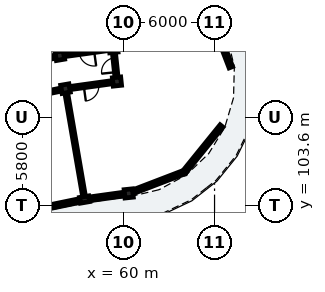
"""IFC4 building model, lengths in metres.
Left out: names, types, materials, properties, quantities, classifications, styles, units other than length and angle.
Written with IfcOpenShell. Run it as: python <this file> out.ifc"""

import sys

from ifc_helpers import new_model, si_unit, direction, frame, frame_2d, origin, origin_2d, place, context, subcontext, project, spatial, rectangle, extrude, element, fill, save


model = new_model("IFC4")
c1 = context("Model", 3, precision=1e-05, world=origin(), true_north=direction((0.0, 1.0)))
c2 = subcontext(c1, "Body", "Model", "MODEL_VIEW")
j1 = project(units=[si_unit("LENGTHUNIT", "METRE"), si_unit("PLANEANGLEUNIT", "RADIAN")], contexts=[c1])
p1 = place(None, origin())
s1 = spatial("IfcSite", under=j1, at=p1, CompositionType="ELEMENT")
p2 = place(p1, origin())
s2 = spatial("IfcBuilding", under=s1, at=p2, CompositionType="ELEMENT")
p3 = place(p2, frame((0.0, 0.0, 15.56)))
s3 = spatial("IfcBuildingStorey", under=s2, at=p3, CompositionType="ELEMENT", Elevation=15.56)
for number, where, z_axis, x_axis in (
    (1, (60.354, 104.406, 0.0), (0.0, 0.0, 1.0), (-0.105, 0.995, 0.0)),
    (2, (59.58, 111.766, 0.0), (0.0, 0.0, 1.0), (-0.105, 0.995, 0.0)),
    (3, (59.35, 113.954, 0.0), (0.0, 0.0, 1.0), (-0.105, 0.995, 0.0)),
):
    element("IfcColumn", number, at=place(p3, frame(where, z_axis=z_axis, x_axis=x_axis)), inside=s3, PredefinedType="COLUMN", context=c2, shape_type="SweptSolid", body=[
        extrude(rectangle(XDim=0.55, YDim=0.55, at=origin_2d()), origin(), (0.0, 0.0, 1.0), 3.11),
    ])
p4 = place(p3, frame((57.451, 104.004, 0.0), z_axis=(0.0, 0.0, 1.0), x_axis=(-0.169827298811, 0.985473839622, 0.0)))
e4 = element("IfcColumn", 4, at=p4, inside=s3, PredefinedType="PILASTER", context=c2, shape_type="SweptSolid", body=[
    extrude(rectangle(XDim=0.38, YDim=0.62, at=origin_2d()), origin(), (0.0, 0.0, 1.0), 3.11),
])
for number, where, z_axis, x_axis in (
    (5, (56.194, 111.297, 0.0), (0.0, 0.0, 1.0), (-0.17, 0.985, 0.0)),
    (6, (55.821, 113.465, 0.0), (0.0, 0.0, 1.0), (-0.17, 0.985, 0.0)),
):
    element("IfcColumn", number, at=place(p3, frame(where, z_axis=z_axis, x_axis=x_axis)), inside=s3, PredefinedType="COLUMN", context=c2, shape_type="SweptSolid", body=[
        extrude(rectangle(XDim=0.55, YDim=0.55, at=origin_2d()), origin(), (0.0, 0.0, 1.0), 3.11),
    ])
p5 = place(p3, frame((60.111, 104.373, 0.0), z_axis=(0.0, 0.0, 1.0), x_axis=(-0.990545622952, -0.13718370476, 0.0)))
e7 = element("IfcWall", 7, at=p5, inside=s3, PredefinedType="SOLIDWALL", context=c2, shape_type="SweptSolid", body=[
    extrude(rectangle(XDim=2.525, YDim=0.245, at=frame_2d((1.263, 0.0))), origin(), (0.0, 0.0, 1.0), 2.355),
])
p6 = place(p5, frame((0.413, 0.0, 0.35)))
e8 = element("IfcOpeningElement", 8, at=p6, cuts=e7, PredefinedType="OPENING", context=c2, shape_type="SweptSolid", body=[
    extrude(rectangle(XDim=1.7, YDim=1.8, at=frame_2d((0.85, 0.9))), frame((0.0, 0.133, 0.0), z_axis=(0.0, -1.0, 0.0), x_axis=(1.0, 0.0, 0.0)), (0.0, 0.0, 1.0), 0.265),
])
p7 = place(p3, frame((57.294, 103.972, 0.0), z_axis=(0.0, 0.0, 1.0), x_axis=(-0.979334432394, -0.20224754517, 0.0)))
e9 = element("IfcWall", 9, at=p7, inside=s3, PredefinedType="SOLIDWALL", context=c2, shape_type="SweptSolid", body=[
    extrude(rectangle(XDim=2.525, YDim=0.245, at=frame_2d((1.263, 0.0))), origin(), (0.0, 0.0, 1.0), 2.355),
])
p8 = place(p7, frame((0.723, 0.0, 0.55)))
e10 = element("IfcOpeningElement", 10, at=p8, cuts=e9, PredefinedType="OPENING", context=c2, shape_type="SweptSolid", body=[
    extrude(rectangle(XDim=1.08, YDim=1.45, at=frame_2d((0.54, 0.725))), frame((0.0, 0.133, 0.0), z_axis=(0.0, -1.0, 0.0), x_axis=(1.0, 0.0, 0.0)), (0.0, 0.0, 1.0), 0.265),
])
p9 = place(p3, frame((65.673, 116.353, 0.0), z_axis=(0.0, 0.0, 1.0), x_axis=(0.358376224971, -0.933577249817, 0.0)))
e11 = element("IfcWall", 11, at=p9, inside=s3, PredefinedType="SOLIDWALL", context=c2, shape_type="SweptSolid", body=[
    extrude(rectangle(XDim=3.908, YDim=0.245, at=frame_2d((1.954, 0.0))), origin(), (0.0, 0.0, 1.0), 2.355),
])
p10 = place(p3, frame((66.462, 108.844, 0.0), z_axis=(0.0, 0.0, 1.0), x_axis=(-0.629331205321, -0.777137204109, 0.0)))
e12 = element("IfcWall", 12, at=p10, inside=s3, PredefinedType="SOLIDWALL", context=c2, shape_type="SweptSolid", body=[
    extrude(rectangle(XDim=3.908, YDim=0.245, at=frame_2d((1.954, 0.0))), origin(), (0.0, 0.0, 1.0), 2.355),
])
p11 = place(p10, frame((0.979, 0.0, 0.4)))
e13 = element("IfcOpeningElement", 13, at=p11, cuts=e12, PredefinedType="OPENING", context=c2, shape_type="SweptSolid", body=[
    extrude(rectangle(XDim=1.95, YDim=1.78, at=frame_2d((0.975, 0.89))), frame((0.0, 0.133, 0.0), z_axis=(0.0, -1.0, 0.0), x_axis=(1.0, 0.0, 0.0)), (0.0, 0.0, 1.0), 0.265),
])
p12 = place(p3, frame((64.002, 105.807, 0.0), z_axis=(0.0, 0.0, 1.0), x_axis=(-0.93356922619, -0.35839712598, 0.0)))
e14 = element("IfcWall", 14, at=p12, inside=s3, PredefinedType="SOLIDWALL", context=c2, shape_type="SweptSolid", body=[
    extrude(rectangle(XDim=3.908, YDim=0.245, at=frame_2d((1.954, 0.0))), origin(), (0.0, 0.0, 1.0), 2.355),
])
p13 = place(p3, frame((59.004, 113.906, 0.0), z_axis=(0.0, 0.0, 1.0), x_axis=(-0.990544162976, -0.137194246211, 0.0)))
e15 = element("IfcWall", 15, at=p13, inside=s3, PredefinedType="PARTITIONING", context=c2, shape_type="SweptSolid", body=[
    extrude(rectangle(XDim=2.863, YDim=0.205, at=frame_2d((1.432, 0.0))), origin(), (0.0, 0.0, 1.0), 2.37),
])
p14 = place(p13, frame((0.937, 0.0, 0.0)))
e16 = element("IfcOpeningElement", 16, at=p14, cuts=e15, PredefinedType="OPENING", context=c2, shape_type="SweptSolid", body=[
    extrude(rectangle(XDim=0.99, YDim=2.16, at=frame_2d((0.495, 1.08))), frame((0.0, 0.113, 0.0), z_axis=(0.0, -1.0, 0.0), x_axis=(1.0, 0.0, 0.0)), (0.0, 0.0, 1.0), 0.225),
])
p15 = place(p3, frame((59.233, 111.718, 0.0), z_axis=(0.0, 0.0, 1.0), x_axis=(-0.990535404475, -0.137257467855, 0.0)))
e17 = element("IfcWall", 17, at=p15, inside=s3, PredefinedType="PARTITIONING", context=c2, shape_type="SweptSolid", body=[
    extrude(rectangle(XDim=2.718, YDim=0.205, at=frame_2d((1.359, 0.0))), origin(), (0.0, 0.0, 1.0), 2.37),
])
p16 = place(p15, frame((0.864, 0.0, 0.0)))
e18 = element("IfcOpeningElement", 18, at=p16, cuts=e17, PredefinedType="OPENING", context=c2, shape_type="SweptSolid", body=[
    extrude(rectangle(XDim=0.99, YDim=2.16, at=frame_2d((0.495, 1.08))), frame((0.0, 0.113, 0.0), z_axis=(0.0, -1.0, 0.0), x_axis=(1.0, 0.0, 0.0)), (0.0, 0.0, 1.0), 0.225),
])
p17 = place(p3, frame((57.383, 104.398, 0.0), z_axis=(0.0, 0.0, 1.0), x_axis=(-0.169825160084, 0.985474208187, 0.0)))
e19 = element("IfcWall", 19, at=p17, inside=s3, PredefinedType="PARTITIONING", context=c2, shape_type="SweptSolid", body=[
    extrude(rectangle(XDim=6.6, YDim=0.185, at=frame_2d((3.3, 0.0))), origin(), (0.0, 0.0, 1.0), 2.37),
])
p18 = place(p3, frame((55.478, 113.394, 0.0), z_axis=(0.0, 0.0, 1.0), x_axis=(-0.979348418612, -0.202179808492, 0.0)))
e20 = element("IfcWall", 20, at=p18, inside=s3, PredefinedType="PARTITIONING", context=c2, shape_type="SweptSolid", body=[
    extrude(rectangle(XDim=2.863, YDim=0.205, at=frame_2d((1.432, 0.0))), origin(), (0.0, 0.0, 1.0), 2.37),
])
p19 = place(p18, frame((0.947, 0.0, 0.0)))
e21 = element("IfcOpeningElement", 21, at=p19, cuts=e20, PredefinedType="OPENING", context=c2, shape_type="SweptSolid", body=[
    extrude(rectangle(XDim=0.97, YDim=2.15, at=frame_2d((0.485, 1.075))), frame((0.0, 0.113, 0.0), z_axis=(0.0, -1.0, 0.0), x_axis=(1.0, 0.0, 0.0)), (0.0, 0.0, 1.0), 0.225),
])
p20 = place(p3, frame((55.852, 111.226, 0.0), z_axis=(0.0, 0.0, 1.0), x_axis=(-0.979349423541, -0.202174940608, 0.0)))
e22 = element("IfcWall", 22, at=p20, inside=s3, PredefinedType="PARTITIONING", context=c2, shape_type="SweptSolid", body=[
    extrude(rectangle(XDim=2.718, YDim=0.205, at=frame_2d((1.359, 0.0))), origin(), (0.0, 0.0, 1.0), 2.37),
])
p21 = place(p20, frame((0.874, 0.0, 0.0)))
e23 = element("IfcOpeningElement", 23, at=p21, cuts=e22, PredefinedType="OPENING", context=c2, shape_type="SweptSolid", body=[
    extrude(rectangle(XDim=0.97, YDim=2.15, at=frame_2d((0.485, 1.075))), frame((0.0, 0.113, 0.0), z_axis=(0.0, -1.0, 0.0), x_axis=(1.0, 0.0, 0.0)), (0.0, 0.0, 1.0), 0.225),
])
p22 = place(p3, frame((59.575, 111.816, 0.0), z_axis=(0.0, 0.0, 1.0), x_axis=(-0.104509292252, 0.994523910136, 0.0)))
e24 = element("IfcWall", 24, at=p22, inside=s3, PredefinedType="PARTITIONING", context=c2, shape_type="SweptSolid", body=[
    extrude(rectangle(XDim=2.1, YDim=0.205, at=frame_2d((1.05, 0.0))), origin(), (0.0, 0.0, 1.0), 2.37),
])
p23 = place(p22, frame((0.57, 0.0, 0.0)))
e25 = element("IfcOpeningElement", 25, at=p23, cuts=e24, PredefinedType="OPENING", context=c2, shape_type="SweptSolid", body=[
    extrude(rectangle(XDim=0.95, YDim=2.13, at=frame_2d((0.475, 1.065))), frame((0.0, 0.113, 0.0), z_axis=(0.0, -1.0, 0.0), x_axis=(1.0, 0.0, 0.0)), (0.0, 0.0, 1.0), 0.225),
])
p24 = place(p6, origin())
e26 = element("IfcWindow", 26, at=p24, inside=s3, PartitioningType="SINGLE_PANEL", PredefinedType="WINDOW", context=c2, shape_type="SweptSolid", body=[
    extrude(rectangle(XDim=1.7, YDim=1.8, at=frame_2d((0.85, 0.9))), frame((0.0, 0.03, 0.0), z_axis=(0.0, -1.0, 0.0), x_axis=(1.0, 0.0, 0.0)), (0.0, 0.0, 1.0), 0.06),
])
fill(e8, e26)
p25 = place(p8, origin())
e27 = element("IfcWindow", 27, at=p25, inside=s3, PartitioningType="SINGLE_PANEL", PredefinedType="WINDOW", context=c2, shape_type="SweptSolid", body=[
    extrude(rectangle(XDim=1.08, YDim=1.45, at=frame_2d((0.54, 0.725))), frame((0.0, 0.03, 0.0), z_axis=(0.0, -1.0, 0.0), x_axis=(1.0, 0.0, 0.0)), (0.0, 0.0, 1.0), 0.06),
])
fill(e10, e27)
p26 = place(p11, origin())
e28 = element("IfcWindow", 28, at=p26, inside=s3, PartitioningType="SINGLE_PANEL", PredefinedType="WINDOW", context=c2, shape_type="SweptSolid", body=[
    extrude(rectangle(XDim=1.95, YDim=1.78, at=frame_2d((0.975, 0.89))), frame((0.0, 0.03, 0.0), z_axis=(0.0, -1.0, 0.0), x_axis=(1.0, 0.0, 0.0)), (0.0, 0.0, 1.0), 0.06),
])
fill(e13, e28)
p27 = place(p14, origin())
e29 = element("IfcDoor", 29, at=p27, inside=s3, OperationType="SINGLE_SWING_LEFT", PredefinedType="DOOR", context=c2, shape_type="SweptSolid", body=[
    extrude(rectangle(XDim=0.99, YDim=2.16, at=frame_2d((0.495, 1.08))), frame((0.0, 0.025, 0.0), z_axis=(0.0, -1.0, 0.0), x_axis=(1.0, 0.0, 0.0)), (0.0, 0.0, 1.0), 0.05),
])
fill(e16, e29)
p28 = place(p16, origin())
e30 = element("IfcDoor", 30, at=p28, inside=s3, OperationType="SINGLE_SWING_RIGHT", PredefinedType="DOOR", context=c2, shape_type="SweptSolid", body=[
    extrude(rectangle(XDim=0.99, YDim=2.16, at=frame_2d((0.495, 1.08))), frame((0.0, 0.025, 0.0), z_axis=(0.0, -1.0, 0.0), x_axis=(1.0, 0.0, 0.0)), (0.0, 0.0, 1.0), 0.05),
])
fill(e18, e30)
p29 = place(p23, origin())
e31 = element("IfcDoor", 31, at=p29, inside=s3, OperationType="SINGLE_SWING_LEFT", PredefinedType="DOOR", context=c2, shape_type="SweptSolid", body=[
    extrude(rectangle(XDim=0.95, YDim=2.13, at=frame_2d((0.475, 1.065))), frame((0.0, 0.025, 0.0), z_axis=(0.0, -1.0, 0.0), x_axis=(1.0, 0.0, 0.0)), (0.0, 0.0, 1.0), 0.05),
])
fill(e25, e31)
save(model, sys.argv[1])
